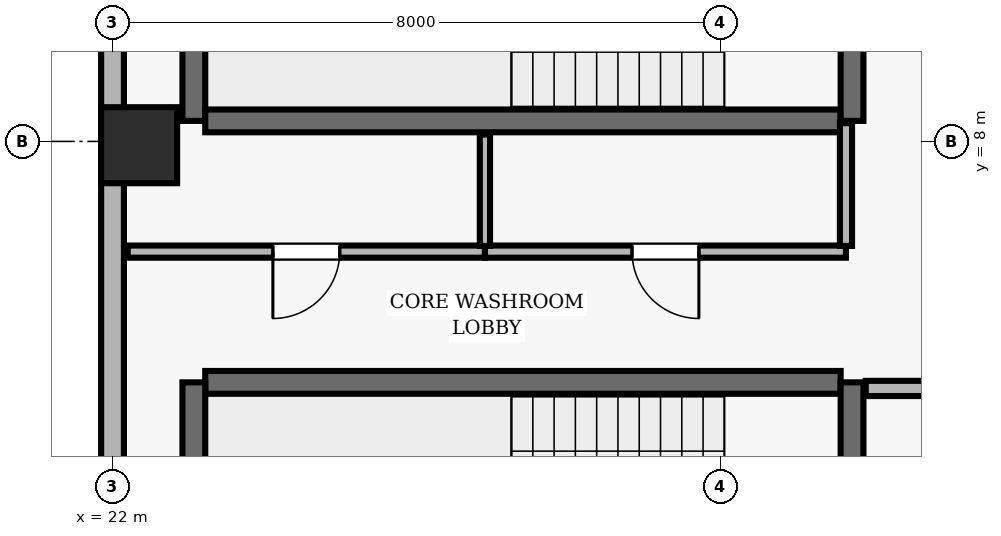
"""IFC4 building model, lengths in metres.
Left out: names, types, materials, properties, quantities, classifications, styles, units other than length and angle.
Written with IfcOpenShell. Run it as: python <this file> out.ifc"""

import sys

from ifc_helpers import new_model, si_unit, direction, frame, frame_2d, origin, origin_2d, place, context, subcontext, project, spatial, rectangle, extrude, element, fill, save


model = new_model("IFC4")
c1 = context("Model", 3, precision=1e-05, world=origin(), true_north=direction((0.0, 1.0)))
c2 = subcontext(c1, "Body", "Model", "MODEL_VIEW")
j1 = project(units=[si_unit("LENGTHUNIT", "METRE"), si_unit("PLANEANGLEUNIT", "RADIAN")], contexts=[c1])
p1 = place(None, origin())
s1 = spatial("IfcSite", under=j1, at=p1, CompositionType="ELEMENT")
p2 = place(p1, origin())
s2 = spatial("IfcBuilding", under=s1, at=p2, CompositionType="ELEMENT")
p3 = place(p2, frame((0.0, 0.0, 226.5)))
s3 = spatial("IfcBuildingStorey", under=s2, at=p3, CompositionType="ELEMENT", Elevation=226.5)
p4 = place(p3, frame((22.35, 7.95, 0.0), z_axis=(0.0, 0.0, 1.0), x_axis=(1.0, 0.0, 0.0)))
e1 = element("IfcColumn", 1, at=p4, inside=s3, PredefinedType="COLUMN", context=c2, shape_type="SweptSolid", body=[
    extrude(rectangle(XDim=1.0, YDim=1.0, at=origin_2d()), origin(), (0.0, 0.0, 1.0), 3.9),
])
p5 = place(p3, frame((22.0, 40.7, 0.0), z_axis=(0.0, 0.0, 1.0), x_axis=(0.0, -1.0, 0.0)))
e2 = element("IfcWall", 2, at=p5, inside=s3, PredefinedType="SOLIDWALL", context=c2, shape_type="SweptSolid", body=[
    extrude(rectangle(XDim=38.2, YDim=0.3, at=frame_2d((19.1, 0.0))), origin(), (0.0, 0.0, 1.0), 3.69),
])
p6 = place(p5, frame((7.8, 0.0, 0.0)))
e3 = element("IfcOpeningElement", 3, at=p6, cuts=e2, PredefinedType="OPENING", context=c2, shape_type="SweptSolid", body=[
    extrude(rectangle(XDim=1.0, YDim=2.2, at=frame_2d((0.5, 1.1))), frame((0.0, 0.16, 0.0), z_axis=(0.0, -1.0, 0.0), x_axis=(1.0, 0.0, 0.0)), (0.0, 0.0, 1.0), 0.32),
])
p7 = place(p5, frame((11.543, 0.0, 0.9)))
e4 = element("IfcOpeningElement", 4, at=p7, cuts=e2, PredefinedType="OPENING", context=c2, shape_type="SweptSolid", body=[
    extrude(rectangle(XDim=2.4, YDim=1.8, at=frame_2d((1.2, 0.9))), frame((0.0, 0.16, 0.0), z_axis=(0.0, -1.0, 0.0), x_axis=(1.0, 0.0, 0.0)), (0.0, 0.0, 1.0), 0.32),
])
p8 = place(p5, frame((18.35, 0.0, 0.9)))
e5 = element("IfcOpeningElement", 5, at=p8, cuts=e2, PredefinedType="OPENING", context=c2, shape_type="SweptSolid", body=[
    extrude(rectangle(XDim=2.4, YDim=1.8, at=frame_2d((1.2, 0.9))), frame((0.0, 0.16, 0.0), z_axis=(0.0, -1.0, 0.0), x_axis=(1.0, 0.0, 0.0)), (0.0, 0.0, 1.0), 0.32),
])
p9 = place(p5, frame((22.907, 0.0, 0.9)))
e6 = element("IfcOpeningElement", 6, at=p9, cuts=e2, PredefinedType="OPENING", context=c2, shape_type="SweptSolid", body=[
    extrude(rectangle(XDim=2.4, YDim=1.8, at=frame_2d((1.2, 0.9))), frame((0.0, 0.16, 0.0), z_axis=(0.0, -1.0, 0.0), x_axis=(1.0, 0.0, 0.0)), (0.0, 0.0, 1.0), 0.32),
])
p10 = place(p5, frame((28.814, 0.0, 0.9)))
e7 = element("IfcOpeningElement", 7, at=p10, cuts=e2, PredefinedType="OPENING", context=c2, shape_type="SweptSolid", body=[
    extrude(rectangle(XDim=2.4, YDim=1.8, at=frame_2d((1.2, 0.9))), frame((0.0, 0.16, 0.0), z_axis=(0.0, -1.0, 0.0), x_axis=(1.0, 0.0, 0.0)), (0.0, 0.0, 1.0), 0.32),
])
p11 = place(p3, frame((31.58, 4.83, 0.0), z_axis=(0.0, 0.0, 1.0), x_axis=(-1.0, 0.0, 0.0)))
e8 = element("IfcWall", 8, at=p11, inside=s3, PredefinedType="SHEAR", context=c2, shape_type="SweptSolid", body=[
    extrude(rectangle(XDim=8.36, YDim=0.3, at=frame_2d((4.18, 0.0))), origin(), (0.0, 0.0, 1.0), 3.69),
])
p12 = place(p3, frame((23.07, 4.83, 0.0), z_axis=(0.0, 0.0, 1.0), x_axis=(0.0, -1.0, 0.0)))
e9 = element("IfcWall", 9, at=p12, inside=s3, PredefinedType="SHEAR", context=c2, shape_type="SweptSolid", body=[
    extrude(rectangle(XDim=3.51, YDim=0.3, at=frame_2d((1.755, 0.0))), origin(), (0.0, 0.0, 1.0), 3.69),
])
p13 = place(p3, frame((31.73, 0.96, 0.0), z_axis=(0.0, 0.0, 1.0), x_axis=(0.0, 1.0, 0.0)))
e10 = element("IfcWall", 10, at=p13, inside=s3, PredefinedType="SHEAR", context=c2, shape_type="SweptSolid", body=[
    extrude(rectangle(XDim=3.87, YDim=0.3, at=frame_2d((1.935, 0.0))), origin(), (0.0, 0.0, 1.0), 3.69),
])
p14 = place(p13, frame((1.54, 0.0, 0.0)))
e11 = element("IfcOpeningElement", 11, at=p14, cuts=e10, PredefinedType="OPENING", context=c2, shape_type="SweptSolid", body=[
    extrude(rectangle(XDim=1.15, YDim=2.15, at=frame_2d((0.575, 1.075))), frame((0.0, 0.16, 0.0), z_axis=(0.0, -1.0, 0.0), x_axis=(1.0, 0.0, 0.0)), (0.0, 0.0, 1.0), 0.32),
])
p15 = place(p3, frame((23.07, 11.78, 0.0), z_axis=(0.0, 0.0, 1.0), x_axis=(0.0, -1.0, 0.0)))
e12 = element("IfcWall", 12, at=p15, inside=s3, PredefinedType="SHEAR", context=c2, shape_type="SweptSolid", body=[
    extrude(rectangle(XDim=3.51, YDim=0.3, at=frame_2d((1.755, 0.0))), origin(), (0.0, 0.0, 1.0), 3.69),
])
p16 = place(p3, frame((23.22, 8.27, 0.0), z_axis=(0.0, 0.0, 1.0), x_axis=(1.0, 0.0, 0.0)))
e13 = element("IfcWall", 13, at=p16, inside=s3, PredefinedType="SHEAR", context=c2, shape_type="SweptSolid", body=[
    extrude(rectangle(XDim=8.36, YDim=0.3, at=frame_2d((4.18, 0.0))), origin(), (0.0, 0.0, 1.0), 3.69),
])
p17 = place(p3, frame((31.73, 8.27, 0.0), z_axis=(0.0, 0.0, 1.0), x_axis=(0.0, 1.0, 0.0)))
e14 = element("IfcWall", 14, at=p17, inside=s3, PredefinedType="SHEAR", context=c2, shape_type="SweptSolid", body=[
    extrude(rectangle(XDim=3.51, YDim=0.3, at=frame_2d((1.755, 0.0))), origin(), (0.0, 0.0, 1.0), 3.69),
])
p18 = place(p17, frame((1.18, 0.0, 0.0)))
e15 = element("IfcOpeningElement", 15, at=p18, cuts=e14, PredefinedType="OPENING", context=c2, shape_type="SweptSolid", body=[
    extrude(rectangle(XDim=1.15, YDim=2.15, at=frame_2d((0.575, 1.075))), frame((0.0, 0.16, 0.0), z_axis=(0.0, -1.0, 0.0), x_axis=(1.0, 0.0, 0.0)), (0.0, 0.0, 1.0), 0.32),
])
p19 = place(p3, frame((26.9, 6.55, 0.0), z_axis=(0.0, 0.0, 1.0), x_axis=(-1.0, 0.0, 0.0)))
e16 = element("IfcWall", 16, at=p19, inside=s3, PredefinedType="PARTITIONING", context=c2, shape_type="SweptSolid", body=[
    extrude(rectangle(XDim=4.7, YDim=0.16, at=frame_2d((2.35, 0.0))), origin(), (0.0, 0.0, 1.0), 3.69),
])
p20 = place(p19, frame((1.91, 0.0, 0.0)))
e17 = element("IfcOpeningElement", 17, at=p20, cuts=e16, PredefinedType="OPENING", context=c2, shape_type="SweptSolid", body=[
    extrude(rectangle(XDim=0.88, YDim=2.1, at=frame_2d((0.44, 1.05))), frame((0.0, 0.09, 0.0), z_axis=(0.0, -1.0, 0.0), x_axis=(1.0, 0.0, 0.0)), (0.0, 0.0, 1.0), 0.18),
])
p21 = place(p3, frame((31.65, 6.55, 0.0), z_axis=(0.0, 0.0, 1.0), x_axis=(-1.0, 0.0, 0.0)))
e18 = element("IfcWall", 18, at=p21, inside=s3, PredefinedType="PARTITIONING", context=c2, shape_type="SweptSolid", body=[
    extrude(rectangle(XDim=4.75, YDim=0.16, at=frame_2d((2.375, 0.0))), origin(), (0.0, 0.0, 1.0), 3.69),
])
p22 = place(p21, frame((1.935, 0.0, 0.0)))
e19 = element("IfcOpeningElement", 19, at=p22, cuts=e18, PredefinedType="OPENING", context=c2, shape_type="SweptSolid", body=[
    extrude(rectangle(XDim=0.88, YDim=2.1, at=frame_2d((0.44, 1.05))), frame((0.0, 0.09, 0.0), z_axis=(0.0, -1.0, 0.0), x_axis=(1.0, 0.0, 0.0)), (0.0, 0.0, 1.0), 0.18),
])
p23 = place(p3, frame((35.02, 4.75, 0.0), z_axis=(0.0, 0.0, 1.0), x_axis=(-1.0, 0.0, 0.0)))
e20 = element("IfcWall", 20, at=p23, inside=s3, PredefinedType="SOLIDWALL", context=c2, shape_type="SweptSolid", body=[
    extrude(rectangle(XDim=3.11, YDim=0.2, at=frame_2d((1.555, 0.0))), origin(), (0.0, 0.0, 1.0), 3.69),
])
p24 = place(p23, frame((1.03, 0.0, 0.0)))
e21 = element("IfcOpeningElement", 21, at=p24, cuts=e20, PredefinedType="OPENING", context=c2, shape_type="SweptSolid", body=[
    extrude(rectangle(XDim=1.05, YDim=2.15, at=frame_2d((0.525, 1.075))), frame((0.0, 0.11, 0.0), z_axis=(0.0, -1.0, 0.0), x_axis=(1.0, 0.0, 0.0)), (0.0, 0.0, 1.0), 0.22),
])
p25 = place(p3, frame((26.9, 6.625, 0.0), z_axis=(0.0, 0.0, 1.0), x_axis=(0.0, 1.0, 0.0)))
e22 = element("IfcWall", 22, at=p25, inside=s3, PredefinedType="PARTITIONING", context=c2, shape_type="SweptSolid", body=[
    extrude(rectangle(XDim=1.465, YDim=0.135, at=frame_2d((0.732, 0.0))), origin(), (0.0, 0.0, 1.0), 3.69),
])
p26 = place(p3, frame((31.65, 8.24, 0.0), z_axis=(0.0, 0.0, 1.0), x_axis=(0.0, -1.0, 0.0)))
e23 = element("IfcWall", 23, at=p26, inside=s3, PredefinedType="PARTITIONING", context=c2, shape_type="SweptSolid", body=[
    extrude(rectangle(XDim=1.615, YDim=0.16, at=frame_2d((0.808, 0.0))), origin(), (0.0, 0.0, 1.0), 3.69),
])
p27 = place(p20, origin())
e24 = element("IfcDoor", 24, at=p27, inside=s3, OperationType="SINGLE_SWING_RIGHT", PredefinedType="DOOR", context=c2, shape_type="SweptSolid", body=[
    extrude(rectangle(XDim=0.88, YDim=2.1, at=frame_2d((0.44, 1.05))), frame((0.0, 0.025, 0.0), z_axis=(0.0, -1.0, 0.0), x_axis=(1.0, 0.0, 0.0)), (0.0, 0.0, 1.0), 0.05),
])
fill(e17, e24)
p28 = place(p22, origin())
e25 = element("IfcDoor", 25, at=p28, inside=s3, OperationType="SINGLE_SWING_LEFT", PredefinedType="DOOR", context=c2, shape_type="SweptSolid", body=[
    extrude(rectangle(XDim=0.88, YDim=2.1, at=frame_2d((0.44, 1.05))), frame((0.0, 0.025, 0.0), z_axis=(0.0, -1.0, 0.0), x_axis=(1.0, 0.0, 0.0)), (0.0, 0.0, 1.0), 0.05),
])
fill(e19, e25)
save(model, sys.argv[1])
